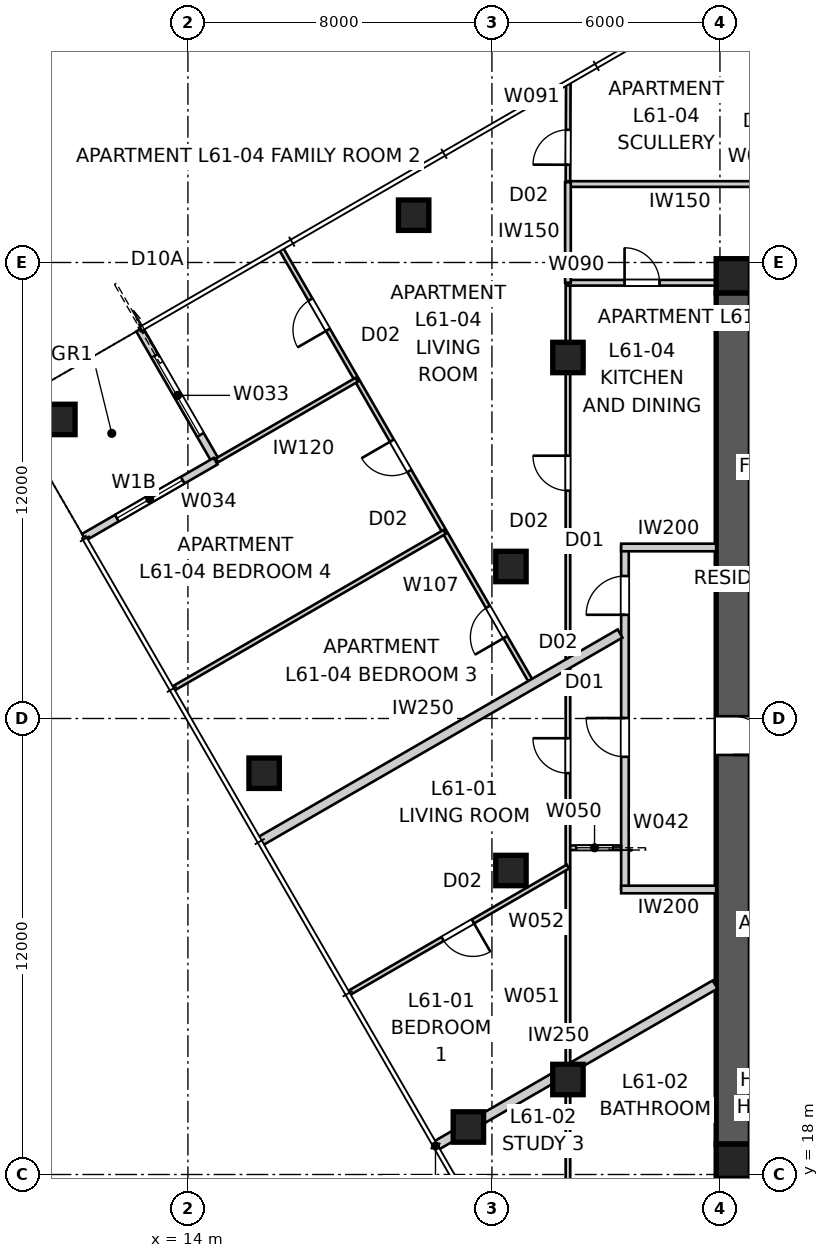
"""IFC4 building model, lengths in metres.
Left out: names, types, materials, properties, quantities, classifications, styles, units other than length and angle.
Written with IfcOpenShell. Run it as: python <this file> out.ifc"""

import sys

from ifc_helpers import new_model, si_unit, direction, frame, frame_2d, origin, origin_2d, place, context, subcontext, project, spatial, polyline, rectangle, outline, extrude, element, fill, save


model = new_model("IFC4")
c1 = context("Model", 3, precision=1e-05, world=origin(), true_north=direction((0.0, 1.0)))
c2 = subcontext(c1, "Body", "Model", "MODEL_VIEW")
j1 = project(units=[si_unit("LENGTHUNIT", "METRE"), si_unit("PLANEANGLEUNIT", "RADIAN")], contexts=[c1])
p1 = place(None, origin())
s1 = spatial("IfcSite", under=j1, at=p1, CompositionType="ELEMENT")
p2 = place(p1, origin())
s2 = spatial("IfcBuilding", under=s1, at=p2, CompositionType="ELEMENT")
p3 = place(p2, frame((0.0, 0.0, 221.8)))
s3 = spatial("IfcBuildingStorey", under=s2, at=p3, CompositionType="ELEMENT", Elevation=221.8)
for number, where, z_axis, x_axis in (
    (1, (28.8, 41.65, 0.0), (0.0, 0.0, 1.0), (1.0, 0.0, 0.0)),
    (2, (51.2, 18.35, 0.0), (0.0, 0.0, 1.0), (-1.0, 0.0, 0.0)),
):
    element("IfcWall", number, at=place(p3, frame(where, z_axis=z_axis, x_axis=x_axis)), inside=s3, PredefinedType="SHEAR", context=c2, shape_type="SweptSolid", body=[
        extrude(outline(polyline([(0.0, -0.45), (22.4, -0.45), (22.4, -0.025), (22.85, -0.025), (22.85, 0.025), (22.4, 0.025), (22.4, 0.45), (0.0, 0.45), (0.0, 0.025), (-0.45, 0.025), (-0.45, -0.025), (0.0, -0.025), (0.0, -0.45)])), origin(), (0.0, 0.0, 1.0), 3.4),
    ])
p4 = place(p3, frame((28.35, 41.2, 0.0), z_axis=(0.0, 0.0, 1.0), x_axis=(0.0, -1.0, 0.0)))
e3 = element("IfcWall", 3, at=p4, inside=s3, PredefinedType="SHEAR", context=c2, shape_type="SweptSolid", body=[
    extrude(outline(polyline([(0.0, -0.45), (22.4, -0.45), (22.4, -0.025), (22.85, -0.025), (22.85, 0.025), (22.4, 0.025), (22.4, 0.45), (0.0, 0.45), (0.0, 0.025), (-0.45, 0.025), (-0.45, -0.025), (0.0, -0.025), (0.0, -0.45)])), origin(), (0.0, 0.0, 1.0), 3.4),
])
p5 = place(p4, frame((11.14, 0.0, 0.0)))
e4 = element("IfcOpeningElement", 4, at=p5, cuts=e3, PredefinedType="OPENING", context=c2, shape_type="SweptSolid", body=[
    extrude(rectangle(XDim=1.02, YDim=2.4, at=frame_2d((0.51, 1.2))), frame((0.0, 0.46, 0.0), z_axis=(0.0, -1.0, 0.0), x_axis=(1.0, 0.0, 0.0)), (0.0, 0.0, 1.0), 0.92),
])
for number, where, z_axis, x_axis in (
    (5, (28.35, 18.35, 0.0), (0.0, 0.0, 1.0), (1.0, 0.0, 0.0)),
    (6, (28.35, 41.65, 0.0), (0.0, 0.0, 1.0), (1.0, 0.0, 0.0)),
):
    element("IfcColumn", number, at=place(p3, frame(where, z_axis=z_axis, x_axis=x_axis)), inside=s3, PredefinedType="COLUMN", context=c2, shape_type="SweptSolid", body=[
        extrude(rectangle(XDim=0.9, YDim=0.9, at=origin_2d()), origin(), (0.0, 0.0, 1.0), 3.4),
    ])
for number, where, z_axis, x_axis in (
    (7, (19.94, 43.245, 0.0), (0.0, 0.0, 1.0), (1.0, 0.0, 0.0)),
    (8, (10.63, 37.87, 0.0), (0.0, 0.0, 1.0), (1.0, 0.0, 0.0)),
    (9, (16.005, 28.56, 0.0), (0.0, 0.0, 1.0), (1.0, 0.0, 0.0)),
    (10, (21.38, 19.25, 0.0), (0.0, 0.0, 1.0), (1.0, 0.0, 0.0)),
    (11, (24.0, 39.5, 0.0), (0.0, 0.0, 1.0), (1.0, 0.0, 0.0)),
    (12, (22.5, 34.0, 0.0), (0.0, 0.0, 1.0), (1.0, 0.0, 0.0)),
    (13, (22.5, 26.0, 0.0), (0.0, 0.0, 1.0), (1.0, 0.0, 0.0)),
    (14, (24.0, 20.5, 0.0), (0.0, 0.0, 1.0), (1.0, 0.0, 0.0)),
):
    element("IfcColumn", number, at=place(p3, frame(where, z_axis=z_axis, x_axis=x_axis)), inside=s3, PredefinedType="COLUMN", context=c2, shape_type="SweptSolid", body=[
        extrude(rectangle(XDim=0.8, YDim=0.8, at=origin_2d()), origin(), (0.0, 0.0, 1.0), 3.4),
    ])
p6 = place(p3, frame((12.729, 40.236, 0.0), z_axis=(0.0, 0.0, 1.0), x_axis=(0.49999894854, -0.866026010844, 0.0)))
e15 = element("IfcWall", 15, at=p6, inside=s3, PredefinedType="SOLIDWALL", context=c2, shape_type="SweptSolid", body=[
    extrude(rectangle(XDim=4.0, YDim=0.2, at=frame_2d((2.0, 0.0))), origin(), (0.0, 0.0, 1.0), 3.25),
])
p7 = place(p6, frame((0.8, 0.0, 0.0)))
e16 = element("IfcOpeningElement", 16, at=p7, cuts=e15, PredefinedType="OPENING", context=c2, shape_type="SweptSolid", body=[
    extrude(rectangle(XDim=2.4, YDim=2.1, at=frame_2d((1.2, 1.05))), frame((0.0, 0.11, 0.0), z_axis=(0.0, -1.0, 0.0), x_axis=(1.0, 0.0, 0.0)), (0.0, 0.0, 1.0), 0.22),
])
p8 = place(p3, frame((14.729, 36.771, 0.0), z_axis=(0.0, 0.0, 1.0), x_axis=(-0.866026010844, -0.49999894854, 0.0)))
e17 = element("IfcWall", 17, at=p8, inside=s3, PredefinedType="SOLIDWALL", context=c2, shape_type="SweptSolid", body=[
    extrude(rectangle(XDim=4.0, YDim=0.2, at=frame_2d((2.0, 0.0))), origin(), (0.0, 0.0, 1.0), 3.25),
])
p9 = place(p8, frame((1.0, 0.0, 0.45)))
e18 = element("IfcOpeningElement", 18, at=p9, cuts=e17, PredefinedType="OPENING", context=c2, shape_type="SweptSolid", body=[
    extrude(rectangle(XDim=2.0, YDim=1.8, at=frame_2d((1.0, 0.9))), frame((0.0, 0.11, 0.0), z_axis=(0.0, -1.0, 0.0), x_axis=(1.0, 0.0, 0.0)), (0.0, 0.0, 1.0), 0.22),
])
p10 = place(p3, frame((25.5, 25.5, 0.0), z_axis=(0.0, 0.0, 1.0), x_axis=(0.0, 1.0, 0.0)))
e19 = element("IfcWall", 19, at=p10, inside=s3, PredefinedType="PARTITIONING", context=c2, shape_type="SweptSolid", body=[
    extrude(rectangle(XDim=9.0, YDim=0.2, at=frame_2d((4.5, 0.0))), origin(), (0.0, 0.0, 1.0), 3.25),
])
p11 = place(p10, frame((3.492, 0.0, 0.0)))
e20 = element("IfcOpeningElement", 20, at=p11, cuts=e19, PredefinedType="OPENING", context=c2, shape_type="SweptSolid", body=[
    extrude(rectangle(XDim=1.02, YDim=2.34, at=frame_2d((0.51, 1.17))), frame((0.0, 0.11, 0.0), z_axis=(0.0, -1.0, 0.0), x_axis=(1.0, 0.0, 0.0)), (0.0, 0.0, 1.0), 0.22),
])
p12 = place(p10, frame((7.229, 0.0, 0.0)))
e21 = element("IfcOpeningElement", 21, at=p12, cuts=e19, PredefinedType="OPENING", context=c2, shape_type="SweptSolid", body=[
    extrude(rectangle(XDim=1.02, YDim=2.34, at=frame_2d((0.51, 1.17))), frame((0.0, 0.11, 0.0), z_axis=(0.0, -1.0, 0.0), x_axis=(1.0, 0.0, 0.0)), (0.0, 0.0, 1.0), 0.22),
])
for number, where, z_axis, x_axis in (
    (22, (27.9, 34.5, 0.0), (0.0, 0.0, 1.0), (-1.0, 0.0, 0.0)),
    (23, (27.9, 25.5, 0.0), (0.0, 0.0, 1.0), (-1.0, 0.0, 0.0)),
):
    element("IfcWall", number, at=place(p3, frame(where, z_axis=z_axis, x_axis=x_axis)), inside=s3, PredefinedType="PARTITIONING", context=c2, shape_type="SweptSolid", body=[
        extrude(rectangle(XDim=2.5, YDim=0.2, at=frame_2d((1.25, 0.0))), origin(), (0.0, 0.0, 1.0), 3.25),
    ])
p13 = place(p3, frame((15.889, 26.761, 0.0), z_axis=(0.0, 0.0, 1.0), x_axis=(0.866024069551, 0.500002310952, 0.0)))
e24 = element("IfcWall", 24, at=p13, inside=s3, PredefinedType="PARTITIONING", context=c2, shape_type="SweptSolid", body=[
    extrude(rectangle(XDim=10.95, YDim=0.25, at=frame_2d((5.475, 0.0))), origin(), (0.0, 0.0, 1.0), 3.25),
])
p14 = place(p3, frame((20.514, 18.75, 0.0), z_axis=(0.0, 0.0, 1.0), x_axis=(0.866020489494, 0.500008511703, 0.0)))
e25 = element("IfcWall", 25, at=p14, inside=s3, PredefinedType="PARTITIONING", context=c2, shape_type="SweptSolid", body=[
    extrude(rectangle(XDim=8.496, YDim=0.25, at=frame_2d((4.248, 0.0))), origin(), (0.0, 0.0, 1.0), 3.25),
])
p15 = place(p3, frame((25.4, 26.598, 0.0), z_axis=(0.0, 0.0, 1.0), x_axis=(-1.0, 0.0, 0.0)))
e26 = element("IfcWall", 26, at=p15, inside=s3, PredefinedType="PARTITIONING", context=c2, shape_type="SweptSolid", body=[
    extrude(rectangle(XDim=1.4, YDim=0.12, at=frame_2d((0.7, 0.0))), origin(), (0.0, 0.0, 1.0), 3.25),
])
p16 = place(p15, frame((0.22, 0.0, 0.0)))
e27 = element("IfcOpeningElement", 27, at=p16, cuts=e26, PredefinedType="OPENING", context=c2, shape_type="SweptSolid", body=[
    extrude(rectangle(XDim=0.96, YDim=2.1, at=frame_2d((0.48, 1.05))), frame((0.0, 0.07, 0.0), z_axis=(0.0, -1.0, 0.0), x_axis=(1.0, 0.0, 0.0)), (0.0, 0.0, 1.0), 0.14),
])
p17 = place(p3, frame((24.0, 15.422, 0.0), z_axis=(0.0, 0.0, 1.0), x_axis=(0.0, 1.0, 0.0)))
e28 = element("IfcWall", 28, at=p17, inside=s3, PredefinedType="PARTITIONING", context=c2, shape_type="SweptSolid", body=[
    extrude(rectangle(XDim=26.045, YDim=0.12, at=frame_2d((13.022, 0.0))), origin(), (0.0, 0.0, 1.0), 2.55),
])
p18 = place(p17, frame((13.139, 0.0, 0.0)))
e29 = element("IfcOpeningElement", 29, at=p18, cuts=e28, PredefinedType="OPENING", context=c2, shape_type="SweptSolid", body=[
    extrude(rectangle(XDim=0.92, YDim=2.34, at=frame_2d((0.46, 1.17))), frame((0.0, 0.07, 0.0), z_axis=(0.0, -1.0, 0.0), x_axis=(1.0, 0.0, 0.0)), (0.0, 0.0, 1.0), 0.14),
])
p19 = place(p17, frame((20.573, 0.0, 0.0)))
e30 = element("IfcOpeningElement", 30, at=p19, cuts=e28, PredefinedType="OPENING", context=c2, shape_type="SweptSolid", body=[
    extrude(rectangle(XDim=0.92, YDim=2.34, at=frame_2d((0.46, 1.17))), frame((0.0, 0.07, 0.0), z_axis=(0.0, -1.0, 0.0), x_axis=(1.0, 0.0, 0.0)), (0.0, 0.0, 1.0), 0.14),
])
p20 = place(p17, frame((0.42, 0.0, 0.0)))
e31 = element("IfcOpeningElement", 31, at=p20, cuts=e28, PredefinedType="OPENING", context=c2, shape_type="SweptSolid", body=[
    extrude(rectangle(XDim=0.92, YDim=2.34, at=frame_2d((0.46, 1.17))), frame((0.0, 0.07, 0.0), z_axis=(0.0, -1.0, 0.0), x_axis=(1.0, 0.0, 0.0)), (0.0, 0.0, 1.0), 0.14),
])
p21 = place(p3, frame((24.0, 26.103, 0.0), z_axis=(0.0, 0.0, 1.0), x_axis=(-0.866017585169, -0.500013541994, 0.0)))
e32 = element("IfcWall", 32, at=p21, inside=s3, PredefinedType="PARTITIONING", context=c2, shape_type="SweptSolid", body=[
    extrude(rectangle(XDim=6.655, YDim=0.12, at=frame_2d((3.328, 0.0))), origin(), (0.0, 0.0, 1.0), 3.25),
])
p22 = place(p21, frame((2.887, 0.0, 0.0)))
e33 = element("IfcOpeningElement", 33, at=p22, cuts=e32, PredefinedType="OPENING", context=c2, shape_type="SweptSolid", body=[
    extrude(rectangle(XDim=0.92, YDim=2.34, at=frame_2d((0.46, 1.17))), frame((0.0, 0.07, 0.0), z_axis=(0.0, -1.0, 0.0), x_axis=(1.0, 0.0, 0.0)), (0.0, 0.0, 1.0), 0.14),
])
p23 = place(p3, frame((24.0, 41.467, 0.0), z_axis=(0.0, 0.0, 1.0), x_axis=(1.0, 0.0, 0.0)))
e34 = element("IfcWall", 34, at=p23, inside=s3, PredefinedType="SOLIDWALL", context=c2, shape_type="SweptSolid", body=[
    extrude(rectangle(XDim=4.82, YDim=0.15, at=frame_2d((2.41, 0.0))), origin(), (0.0, 0.0, 1.0), 3.25),
])
p24 = place(p23, frame((1.49, 0.0, 0.0)))
e35 = element("IfcOpeningElement", 35, at=p24, cuts=e34, PredefinedType="OPENING", context=c2, shape_type="SweptSolid", body=[
    extrude(rectangle(XDim=0.92, YDim=2.1, at=frame_2d((0.46, 1.05))), frame((0.0, 0.085, 0.0), z_axis=(0.0, -1.0, 0.0), x_axis=(1.0, 0.0, 0.0)), (0.0, 0.0, 1.0), 0.17),
])
p25 = place(p3, frame((24.0, 44.115, 0.0), z_axis=(0.0, 0.0, 1.0), x_axis=(0.003773202081, 0.999992881448, 0.0)))
e36 = element("IfcWall", 36, at=p25, inside=s3, PredefinedType="PARTITIONING", context=c2, shape_type="SweptSolid", body=[
    extrude(rectangle(XDim=2.588, YDim=0.12, at=frame_2d((1.294, 0.0))), origin(), (0.0, 0.0, 1.0), 3.25),
])
p26 = place(p25, frame((0.458, 0.0, 0.0)))
e37 = element("IfcOpeningElement", 37, at=p26, cuts=e36, PredefinedType="OPENING", context=c2, shape_type="SweptSolid", body=[
    extrude(rectangle(XDim=0.92, YDim=2.34, at=frame_2d((0.46, 1.17))), frame((0.0, 0.07, 0.0), z_axis=(0.0, -1.0, 0.0), x_axis=(1.0, 0.0, 0.0)), (0.0, 0.0, 1.0), 0.14),
])
p27 = place(p3, frame((28.38, 49.226, 0.0), z_axis=(0.0, 0.0, 1.0), x_axis=(0.499973989716, -0.866040420308, 0.0)))
e38 = element("IfcWall", 38, at=p27, inside=s3, PredefinedType="PARTITIONING", context=c2, shape_type="SweptSolid", body=[
    extrude(rectangle(XDim=3.725, YDim=0.12, at=frame_2d((1.862, 0.0))), origin(), (0.0, 0.0, 1.0), 3.25),
])
p28 = place(p27, frame((1.682, 0.0, 0.0)))
e39 = element("IfcOpeningElement", 39, at=p28, cuts=e38, PredefinedType="OPENING", context=c2, shape_type="SweptSolid", body=[
    extrude(rectangle(XDim=0.92, YDim=2.34, at=frame_2d((0.46, 1.17))), frame((0.0, 0.07, 0.0), z_axis=(0.0, -1.0, 0.0), x_axis=(1.0, 0.0, 0.0)), (0.0, 0.0, 1.0), 0.14),
])
p29 = place(p3, frame((29.897, 44.065, 0.0), z_axis=(0.0, 0.0, 1.0), x_axis=(-1.0, 0.0, 0.0)))
e40 = element("IfcWall", 40, at=p29, inside=s3, PredefinedType="SOLIDWALL", context=c2, shape_type="SweptSolid", body=[
    extrude(rectangle(XDim=5.897, YDim=0.15, at=frame_2d((2.949, 0.0))), origin(), (0.0, 0.0, 1.0), 3.25),
])
p30 = place(p3, frame((23.067, 30.905, 0.0), z_axis=(0.0, 0.0, 1.0), x_axis=(-0.499999220117, 0.86602585405, 0.0)))
e41 = element("IfcWall", 41, at=p30, inside=s3, PredefinedType="PARTITIONING", context=c2, shape_type="SweptSolid", body=[
    extrude(rectangle(XDim=13.21, YDim=0.12, at=frame_2d((6.605, 0.0))), origin(), (0.0, 0.0, 1.0), 3.25),
])
p31 = place(p30, frame((6.478, 0.0, 0.0)))
e42 = element("IfcOpeningElement", 42, at=p31, cuts=e41, PredefinedType="OPENING", context=c2, shape_type="SweptSolid", body=[
    extrude(rectangle(XDim=0.92, YDim=2.34, at=frame_2d((0.46, 1.17))), frame((0.0, 0.07, 0.0), z_axis=(0.0, -1.0, 0.0), x_axis=(1.0, 0.0, 0.0)), (0.0, 0.0, 1.0), 0.14),
])
p32 = place(p30, frame((1.427, 0.0, 0.0)))
e43 = element("IfcOpeningElement", 43, at=p32, cuts=e41, PredefinedType="OPENING", context=c2, shape_type="SweptSolid", body=[
    extrude(rectangle(XDim=0.92, YDim=2.34, at=frame_2d((0.46, 1.17))), frame((0.0, 0.07, 0.0), z_axis=(0.0, -1.0, 0.0), x_axis=(1.0, 0.0, 0.0)), (0.0, 0.0, 1.0), 0.14),
])
p33 = place(p30, frame((10.765, 0.0, 0.0)))
e44 = element("IfcOpeningElement", 44, at=p33, cuts=e41, PredefinedType="OPENING", context=c2, shape_type="SweptSolid", body=[
    extrude(rectangle(XDim=0.92, YDim=2.34, at=frame_2d((0.46, 1.17))), frame((0.0, 0.07, 0.0), z_axis=(0.0, -1.0, 0.0), x_axis=(1.0, 0.0, 0.0)), (0.0, 0.0, 1.0), 0.14),
])
p34 = place(p3, frame((24.0, 44.115, 0.0), z_axis=(0.0, 0.0, 1.0), x_axis=(0.0, -1.0, 0.0)))
e45 = element("IfcWall", 45, at=p34, inside=s3, PredefinedType="SOLIDWALL", context=c2, shape_type="SweptSolid", body=[
    extrude(rectangle(XDim=2.648, YDim=0.15, at=frame_2d((1.324, 0.0))), origin(), (0.0, 0.0, 1.0), 3.25),
])
p35 = place(p3, frame((13.612, 30.786, 0.0), z_axis=(0.0, 0.0, 1.0), x_axis=(0.866032284491, 0.499988082077, 0.0)))
e46 = element("IfcWall", 46, at=p35, inside=s3, PredefinedType="PARTITIONING", context=c2, shape_type="SweptSolid", body=[
    extrude(rectangle(XDim=8.248, YDim=0.12, at=frame_2d((4.124, 0.0))), origin(), (0.0, 0.0, 1.0), 3.25),
])
p36 = place(p3, frame((14.763, 36.792, 0.0), z_axis=(0.0, 0.0, 1.0), x_axis=(0.86603819212, 0.4999778493, 0.0)))
e47 = element("IfcWall", 47, at=p36, inside=s3, PredefinedType="PARTITIONING", context=c2, shape_type="SweptSolid", body=[
    extrude(rectangle(XDim=4.248, YDim=0.12, at=frame_2d((2.124, 0.0))), origin(), (0.0, 0.0, 1.0), 3.25),
])
p37 = place(p7, origin())
e48 = element("IfcDoor", 48, at=p37, inside=s3, OperationType="SLIDING_TO_LEFT", PredefinedType="DOOR", context=c2, shape_type="SweptSolid", body=[
    extrude(rectangle(XDim=2.4, YDim=2.1, at=frame_2d((1.2, 1.05))), frame((0.0, 0.025, 0.0), z_axis=(0.0, -1.0, 0.0), x_axis=(1.0, 0.0, 0.0)), (0.0, 0.0, 1.0), 0.05),
])
fill(e16, e48)
p38 = place(p9, origin())
e49 = element("IfcWindow", 49, at=p38, inside=s3, PartitioningType="SINGLE_PANEL", PredefinedType="WINDOW", context=c2, shape_type="SweptSolid", body=[
    extrude(rectangle(XDim=2.0, YDim=1.8, at=frame_2d((1.0, 0.9))), frame((0.0, 0.03, 0.0), z_axis=(0.0, -1.0, 0.0), x_axis=(1.0, 0.0, 0.0)), (0.0, 0.0, 1.0), 0.06),
])
fill(e18, e49)
p39 = place(p11, origin())
e50 = element("IfcDoor", 50, at=p39, inside=s3, OperationType="SINGLE_SWING_RIGHT", PredefinedType="DOOR", context=c2, shape_type="SweptSolid", body=[
    extrude(rectangle(XDim=1.02, YDim=2.34, at=frame_2d((0.51, 1.17))), frame((0.0, 0.025, 0.0), z_axis=(0.0, -1.0, 0.0), x_axis=(1.0, 0.0, 0.0)), (0.0, 0.0, 1.0), 0.05),
])
fill(e20, e50)
p40 = place(p12, origin())
e51 = element("IfcDoor", 51, at=p40, inside=s3, OperationType="SINGLE_SWING_LEFT", PredefinedType="DOOR", context=c2, shape_type="SweptSolid", body=[
    extrude(rectangle(XDim=1.02, YDim=2.34, at=frame_2d((0.51, 1.17))), frame((0.0, 0.025, 0.0), z_axis=(0.0, -1.0, 0.0), x_axis=(1.0, 0.0, 0.0)), (0.0, 0.0, 1.0), 0.05),
])
fill(e21, e51)
p41 = place(p18, origin())
e52 = element("IfcDoor", 52, at=p41, inside=s3, OperationType="SINGLE_SWING_RIGHT", PredefinedType="DOOR", context=c2, shape_type="SweptSolid", body=[
    extrude(rectangle(XDim=0.92, YDim=2.34, at=frame_2d((0.46, 1.17))), frame((0.0, 0.025, 0.0), z_axis=(0.0, -1.0, 0.0), x_axis=(1.0, 0.0, 0.0)), (0.0, 0.0, 1.0), 0.05),
])
fill(e29, e52)
p42 = place(p16, origin())
e53 = element("IfcDoor", 53, at=p42, inside=s3, OperationType="SLIDING_TO_LEFT", PredefinedType="DOOR", context=c2, shape_type="SweptSolid", body=[
    extrude(rectangle(XDim=0.96, YDim=2.1, at=frame_2d((0.48, 1.05))), frame((0.0, 0.025, 0.0), z_axis=(0.0, -1.0, 0.0), x_axis=(1.0, 0.0, 0.0)), (0.0, 0.0, 1.0), 0.05),
])
fill(e27, e53)
p43 = place(p19, origin())
e54 = element("IfcDoor", 54, at=p43, inside=s3, OperationType="SINGLE_SWING_RIGHT", PredefinedType="DOOR", context=c2, shape_type="SweptSolid", body=[
    extrude(rectangle(XDim=0.92, YDim=2.34, at=frame_2d((0.46, 1.17))), frame((0.0, 0.025, 0.0), z_axis=(0.0, -1.0, 0.0), x_axis=(1.0, 0.0, 0.0)), (0.0, 0.0, 1.0), 0.05),
])
fill(e30, e54)
p44 = place(p24, origin())
e55 = element("IfcDoor", 55, at=p44, inside=s3, OperationType="SINGLE_SWING_LEFT", PredefinedType="DOOR", context=c2, shape_type="SweptSolid", body=[
    extrude(rectangle(XDim=0.92, YDim=2.1, at=frame_2d((0.46, 1.05))), frame((0.0, 0.025, 0.0), z_axis=(0.0, -1.0, 0.0), x_axis=(1.0, 0.0, 0.0)), (0.0, 0.0, 1.0), 0.05),
])
fill(e35, e55)
p45 = place(p22, origin())
e56 = element("IfcDoor", 56, at=p45, inside=s3, OperationType="SINGLE_SWING_LEFT", PredefinedType="DOOR", context=c2, shape_type="SweptSolid", body=[
    extrude(rectangle(XDim=0.92, YDim=2.34, at=frame_2d((0.46, 1.17))), frame((0.0, 0.025, 0.0), z_axis=(0.0, -1.0, 0.0), x_axis=(1.0, 0.0, 0.0)), (0.0, 0.0, 1.0), 0.05),
])
fill(e33, e56)
p46 = place(p31, origin())
e57 = element("IfcDoor", 57, at=p46, inside=s3, OperationType="SINGLE_SWING_RIGHT", PredefinedType="DOOR", context=c2, shape_type="SweptSolid", body=[
    extrude(rectangle(XDim=0.92, YDim=2.34, at=frame_2d((0.46, 1.17))), frame((0.0, 0.025, 0.0), z_axis=(0.0, -1.0, 0.0), x_axis=(1.0, 0.0, 0.0)), (0.0, 0.0, 1.0), 0.05),
])
fill(e42, e57)
p47 = place(p32, origin())
e58 = element("IfcDoor", 58, at=p47, inside=s3, OperationType="SINGLE_SWING_LEFT", PredefinedType="DOOR", context=c2, shape_type="SweptSolid", body=[
    extrude(rectangle(XDim=0.92, YDim=2.34, at=frame_2d((0.46, 1.17))), frame((0.0, 0.025, 0.0), z_axis=(0.0, -1.0, 0.0), x_axis=(1.0, 0.0, 0.0)), (0.0, 0.0, 1.0), 0.05),
])
fill(e43, e58)
p48 = place(p33, origin())
e59 = element("IfcDoor", 59, at=p48, inside=s3, OperationType="SINGLE_SWING_LEFT", PredefinedType="DOOR", context=c2, shape_type="SweptSolid", body=[
    extrude(rectangle(XDim=0.92, YDim=2.34, at=frame_2d((0.46, 1.17))), frame((0.0, 0.025, 0.0), z_axis=(0.0, -1.0, 0.0), x_axis=(1.0, 0.0, 0.0)), (0.0, 0.0, 1.0), 0.05),
])
fill(e44, e59)
p49 = place(p26, origin())
e60 = element("IfcDoor", 60, at=p49, inside=s3, OperationType="SINGLE_SWING_LEFT", PredefinedType="DOOR", context=c2, shape_type="SweptSolid", body=[
    extrude(rectangle(XDim=0.92, YDim=2.34, at=frame_2d((0.46, 1.17))), frame((0.0, 0.025, 0.0), z_axis=(0.0, -1.0, 0.0), x_axis=(1.0, 0.0, 0.0)), (0.0, 0.0, 1.0), 0.05),
])
fill(e37, e60)
p50 = place(p5, origin())
e61 = element("IfcDoor", 61, at=p50, inside=s3, OperationType="SINGLE_SWING_RIGHT", PredefinedType="DOOR", context=c2, shape_type="SweptSolid", body=[
    extrude(rectangle(XDim=1.02, YDim=2.4, at=frame_2d((0.51, 1.2))), frame((0.0, 0.025, 0.0), z_axis=(0.0, -1.0, 0.0), x_axis=(1.0, 0.0, 0.0)), (0.0, 0.0, 1.0), 0.05),
])
fill(e4, e61)
save(model, sys.argv[1])
